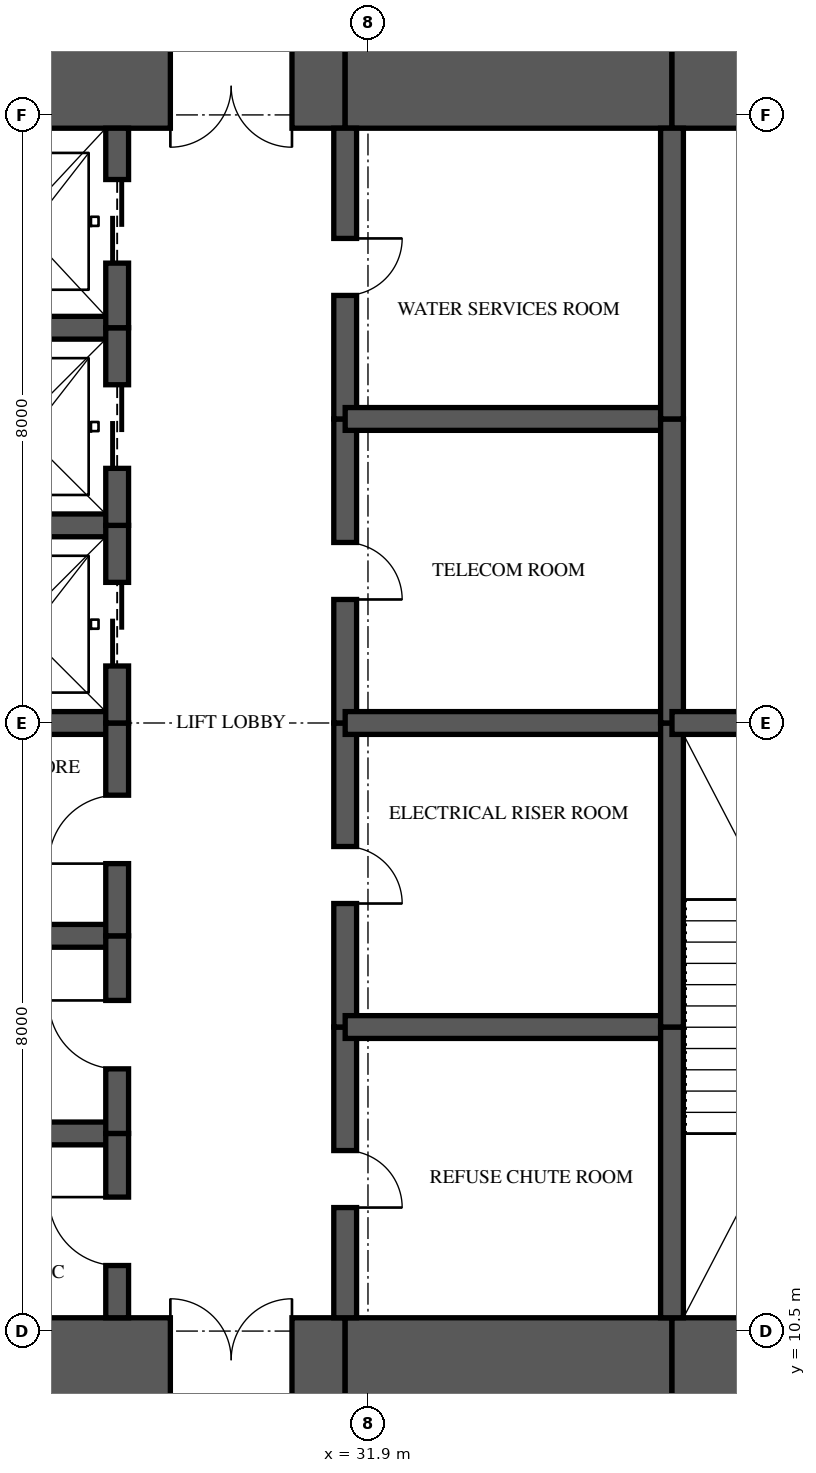
"""IFC4 building model, lengths in metres.
Left out: names, types, materials, properties, quantities, classifications, styles, units other than length and angle.
Written with IfcOpenShell. Run it as: python <this file> out.ifc"""

import sys

from ifc_helpers import new_model, si_unit, direction, frame, frame_2d, origin, place, context, subcontext, project, spatial, rectangle, extrude, element, fill, save


model = new_model("IFC4")
c1 = context("Model", 3, precision=1e-05, world=origin(), true_north=direction((0.0, 1.0)))
c2 = subcontext(c1, "Body", "Model", "MODEL_VIEW")
j1 = project(units=[si_unit("LENGTHUNIT", "METRE"), si_unit("PLANEANGLEUNIT", "RADIAN")], contexts=[c1])
p1 = place(None, origin())
s1 = spatial("IfcSite", under=j1, at=p1, CompositionType="ELEMENT")
p2 = place(p1, origin())
s2 = spatial("IfcBuilding", under=s1, at=p2, CompositionType="ELEMENT")
p3 = place(p2, frame((0.0, 0.0, 217.95)))
s3 = spatial("IfcBuildingStorey", under=s2, at=p3, CompositionType="ELEMENT", Elevation=217.95)
p4 = place(p3, frame((26.0, 10.125, 0.0), z_axis=(0.0, 0.0, 1.0), x_axis=(1.0, 0.0, 0.0)))
e1 = element("IfcWall", 1, at=p4, inside=s3, PredefinedType="SHEAR", context=c2, shape_type="SweptSolid", body=[
    extrude(rectangle(XDim=5.6, YDim=1.1, at=frame_2d((2.8, 0.0))), origin(), (0.0, 0.0, 1.0), 3.5),
])
p5 = place(p4, frame((3.3, 0.0, 0.0)))
e2 = element("IfcOpeningElement", 2, at=p5, cuts=e1, PredefinedType="OPENING", context=c2, shape_type="SweptSolid", body=[
    extrude(rectangle(XDim=1.6, YDim=2.1, at=frame_2d((0.8, 1.05))), frame((0.0, 0.56, 0.0), z_axis=(0.0, -1.0, 0.0), x_axis=(1.0, 0.0, 0.0)), (0.0, 0.0, 1.0), 1.12),
])
p6 = place(p3, frame((31.6, 10.125, 0.0), z_axis=(0.0, 0.0, 1.0), x_axis=(1.0, 0.0, 0.0)))
e3 = element("IfcWall", 3, at=p6, inside=s3, PredefinedType="SHEAR", context=c2, shape_type="SweptSolid", body=[
    extrude(rectangle(XDim=4.3, YDim=1.1, at=frame_2d((2.15, 0.0))), origin(), (0.0, 0.0, 1.0), 3.5),
])
p7 = place(p3, frame((35.9, 10.125, 0.0), z_axis=(0.0, 0.0, 1.0), x_axis=(1.0, 0.0, 0.0)))
e4 = element("IfcWall", 4, at=p7, inside=s3, PredefinedType="SHEAR", context=c2, shape_type="SweptSolid", body=[
    extrude(rectangle(XDim=8.175, YDim=1.1, at=frame_2d((4.087, 0.0))), origin(), (0.0, 0.0, 1.0), 3.5),
])
p8 = place(p7, frame((2.7, 0.0, 0.0)))
e5 = element("IfcOpeningElement", 5, at=p8, cuts=e4, PredefinedType="OPENING", context=c2, shape_type="SweptSolid", body=[
    extrude(rectangle(XDim=1.0, YDim=2.1, at=frame_2d((0.5, 1.05))), frame((0.0, 0.56, 0.0), z_axis=(0.0, -1.0, 0.0), x_axis=(1.0, 0.0, 0.0)), (0.0, 0.0, 1.0), 1.12),
])
p9 = place(p3, frame((44.075, 26.875, 0.0), z_axis=(0.0, 0.0, 1.0), x_axis=(-1.0, 0.0, 0.0)))
e6 = element("IfcWall", 6, at=p9, inside=s3, PredefinedType="SHEAR", context=c2, shape_type="SweptSolid", body=[
    extrude(rectangle(XDim=8.175, YDim=1.1, at=frame_2d((4.087, 0.0))), origin(), (0.0, 0.0, 1.0), 3.5),
])
p10 = place(p9, frame((5.575, 0.0, 0.0)))
e7 = element("IfcOpeningElement", 7, at=p10, cuts=e6, PredefinedType="OPENING", context=c2, shape_type="SweptSolid", body=[
    extrude(rectangle(XDim=0.9, YDim=2.1, at=frame_2d((0.45, 1.05))), frame((0.0, 0.56, 0.0), z_axis=(0.0, -1.0, 0.0), x_axis=(1.0, 0.0, 0.0)), (0.0, 0.0, 1.0), 1.12),
])
p11 = place(p3, frame((35.9, 26.875, 0.0), z_axis=(0.0, 0.0, 1.0), x_axis=(-1.0, 0.0, 0.0)))
e8 = element("IfcWall", 8, at=p11, inside=s3, PredefinedType="SHEAR", context=c2, shape_type="SweptSolid", body=[
    extrude(rectangle(XDim=4.3, YDim=1.1, at=frame_2d((2.15, 0.0))), origin(), (0.0, 0.0, 1.0), 3.5),
])
p12 = place(p3, frame((31.6, 26.875, 0.0), z_axis=(0.0, 0.0, 1.0), x_axis=(-1.0, 0.0, 0.0)))
e9 = element("IfcWall", 9, at=p12, inside=s3, PredefinedType="SHEAR", context=c2, shape_type="SweptSolid", body=[
    extrude(rectangle(XDim=5.6, YDim=1.1, at=frame_2d((2.8, 0.0))), origin(), (0.0, 0.0, 1.0), 3.5),
])
p13 = place(p12, frame((0.7, 0.0, 0.0)))
e10 = element("IfcOpeningElement", 10, at=p13, cuts=e9, PredefinedType="OPENING", context=c2, shape_type="SweptSolid", body=[
    extrude(rectangle(XDim=1.6, YDim=2.1, at=frame_2d((0.8, 1.05))), frame((0.0, 0.56, 0.0), z_axis=(0.0, -1.0, 0.0), x_axis=(1.0, 0.0, 0.0)), (0.0, 0.0, 1.0), 1.12),
])
p14 = place(p3, frame((28.6, 10.675, 0.0), z_axis=(0.0, 0.0, 1.0), x_axis=(0.0, 1.0, 0.0)))
e11 = element("IfcWall", 11, at=p14, inside=s3, PredefinedType="SHEAR", context=c2, shape_type="SweptSolid", body=[
    extrude(rectangle(XDim=2.425, YDim=0.3, at=frame_2d((1.212, 0.0))), origin(), (0.0, 0.0, 1.0), 3.5),
])
p15 = place(p14, frame((0.688, 0.0, 0.0)))
e12 = element("IfcOpeningElement", 12, at=p15, cuts=e11, PredefinedType="OPENING", context=c2, shape_type="SweptSolid", body=[
    extrude(rectangle(XDim=0.9, YDim=2.1, at=frame_2d((0.45, 1.05))), frame((0.0, 0.16, 0.0), z_axis=(0.0, -1.0, 0.0), x_axis=(1.0, 0.0, 0.0)), (0.0, 0.0, 1.0), 0.32),
])
p16 = place(p3, frame((28.6, 13.1, 0.0), z_axis=(0.0, 0.0, 1.0), x_axis=(0.0, 1.0, 0.0)))
e13 = element("IfcWall", 13, at=p16, inside=s3, PredefinedType="SHEAR", context=c2, shape_type="SweptSolid", body=[
    extrude(rectangle(XDim=2.6, YDim=0.3, at=frame_2d((1.3, 0.0))), origin(), (0.0, 0.0, 1.0), 3.5),
])
p17 = place(p16, frame((0.85, 0.0, 0.0)))
e14 = element("IfcOpeningElement", 14, at=p17, cuts=e13, PredefinedType="OPENING", context=c2, shape_type="SweptSolid", body=[
    extrude(rectangle(XDim=0.9, YDim=2.1, at=frame_2d((0.45, 1.05))), frame((0.0, 0.16, 0.0), z_axis=(0.0, -1.0, 0.0), x_axis=(1.0, 0.0, 0.0)), (0.0, 0.0, 1.0), 0.32),
])
p18 = place(p3, frame((28.6, 15.7, 0.0), z_axis=(0.0, 0.0, 1.0), x_axis=(0.0, 1.0, 0.0)))
e15 = element("IfcWall", 15, at=p18, inside=s3, PredefinedType="SHEAR", context=c2, shape_type="SweptSolid", body=[
    extrude(rectangle(XDim=2.8, YDim=0.3, at=frame_2d((1.4, 0.0))), origin(), (0.0, 0.0, 1.0), 3.5),
])
p19 = place(p18, frame((0.95, 0.0, 0.0)))
e16 = element("IfcOpeningElement", 16, at=p19, cuts=e15, PredefinedType="OPENING", context=c2, shape_type="SweptSolid", body=[
    extrude(rectangle(XDim=0.9, YDim=2.1, at=frame_2d((0.45, 1.05))), frame((0.0, 0.16, 0.0), z_axis=(0.0, -1.0, 0.0), x_axis=(1.0, 0.0, 0.0)), (0.0, 0.0, 1.0), 0.32),
])
p20 = place(p3, frame((28.6, 18.5, 0.0), z_axis=(0.0, 0.0, 1.0), x_axis=(0.0, 1.0, 0.0)))
e17 = element("IfcWall", 17, at=p20, inside=s3, PredefinedType="SHEAR", context=c2, shape_type="SweptSolid", body=[
    extrude(rectangle(XDim=2.6, YDim=0.3, at=frame_2d((1.3, 0.0))), origin(), (0.0, 0.0, 1.0), 3.5),
])
p21 = place(p20, frame((0.75, 0.0, 0.0)))
e18 = element("IfcOpeningElement", 18, at=p21, cuts=e17, PredefinedType="OPENING", context=c2, shape_type="SweptSolid", body=[
    extrude(rectangle(XDim=1.1, YDim=2.1, at=frame_2d((0.55, 1.05))), frame((0.0, 0.16, 0.0), z_axis=(0.0, -1.0, 0.0), x_axis=(1.0, 0.0, 0.0)), (0.0, 0.0, 1.0), 0.32),
])
p22 = place(p3, frame((28.6, 21.1, 0.0), z_axis=(0.0, 0.0, 1.0), x_axis=(0.0, 1.0, 0.0)))
e19 = element("IfcWall", 19, at=p22, inside=s3, PredefinedType="SHEAR", context=c2, shape_type="SweptSolid", body=[
    extrude(rectangle(XDim=2.6, YDim=0.3, at=frame_2d((1.3, 0.0))), origin(), (0.0, 0.0, 1.0), 3.5),
])
p23 = place(p22, frame((0.75, 0.0, 0.0)))
e20 = element("IfcOpeningElement", 20, at=p23, cuts=e19, PredefinedType="OPENING", context=c2, shape_type="SweptSolid", body=[
    extrude(rectangle(XDim=1.1, YDim=2.1, at=frame_2d((0.55, 1.05))), frame((0.0, 0.16, 0.0), z_axis=(0.0, -1.0, 0.0), x_axis=(1.0, 0.0, 0.0)), (0.0, 0.0, 1.0), 0.32),
])
p24 = place(p3, frame((28.6, 23.7, 0.0), z_axis=(0.0, 0.0, 1.0), x_axis=(0.0, 1.0, 0.0)))
e21 = element("IfcWall", 21, at=p24, inside=s3, PredefinedType="SHEAR", context=c2, shape_type="SweptSolid", body=[
    extrude(rectangle(XDim=2.625, YDim=0.3, at=frame_2d((1.312, 0.0))), origin(), (0.0, 0.0, 1.0), 3.5),
])
p25 = place(p24, frame((0.85, 0.0, 0.0)))
e22 = element("IfcOpeningElement", 22, at=p25, cuts=e21, PredefinedType="OPENING", context=c2, shape_type="SweptSolid", body=[
    extrude(rectangle(XDim=1.1, YDim=2.1, at=frame_2d((0.55, 1.05))), frame((0.0, 0.16, 0.0), z_axis=(0.0, -1.0, 0.0), x_axis=(1.0, 0.0, 0.0)), (0.0, 0.0, 1.0), 0.32),
])
p26 = place(p3, frame((31.6, 10.675, 0.0), z_axis=(0.0, 0.0, 1.0), x_axis=(0.0, 1.0, 0.0)))
e23 = element("IfcWall", 23, at=p26, inside=s3, PredefinedType="SHEAR", context=c2, shape_type="SweptSolid", body=[
    extrude(rectangle(XDim=3.825, YDim=0.3, at=frame_2d((1.913, 0.0))), origin(), (0.0, 0.0, 1.0), 3.5),
])
p27 = place(p26, frame((1.45, 0.0, 0.0)))
e24 = element("IfcOpeningElement", 24, at=p27, cuts=e23, PredefinedType="OPENING", context=c2, shape_type="SweptSolid", body=[
    extrude(rectangle(XDim=0.75, YDim=2.1, at=frame_2d((0.375, 1.05))), frame((0.0, 0.16, 0.0), z_axis=(0.0, -1.0, 0.0), x_axis=(1.0, 0.0, 0.0)), (0.0, 0.0, 1.0), 0.32),
])
p28 = place(p3, frame((31.6, 14.5, 0.0), z_axis=(0.0, 0.0, 1.0), x_axis=(0.0, 1.0, 0.0)))
e25 = element("IfcWall", 25, at=p28, inside=s3, PredefinedType="SHEAR", context=c2, shape_type="SweptSolid", body=[
    extrude(rectangle(XDim=4.0, YDim=0.3, at=frame_2d((2.0, 0.0))), origin(), (0.0, 0.0, 1.0), 3.5),
])
p29 = place(p28, frame((1.625, 0.0, 0.0)))
e26 = element("IfcOpeningElement", 26, at=p29, cuts=e25, PredefinedType="OPENING", context=c2, shape_type="SweptSolid", body=[
    extrude(rectangle(XDim=0.75, YDim=2.1, at=frame_2d((0.375, 1.05))), frame((0.0, 0.16, 0.0), z_axis=(0.0, -1.0, 0.0), x_axis=(1.0, 0.0, 0.0)), (0.0, 0.0, 1.0), 0.32),
])
p30 = place(p3, frame((31.6, 18.5, 0.0), z_axis=(0.0, 0.0, 1.0), x_axis=(0.0, 1.0, 0.0)))
e27 = element("IfcWall", 27, at=p30, inside=s3, PredefinedType="SHEAR", context=c2, shape_type="SweptSolid", body=[
    extrude(rectangle(XDim=4.0, YDim=0.3, at=frame_2d((2.0, 0.0))), origin(), (0.0, 0.0, 1.0), 3.5),
])
p31 = place(p30, frame((1.625, 0.0, 0.0)))
e28 = element("IfcOpeningElement", 28, at=p31, cuts=e27, PredefinedType="OPENING", context=c2, shape_type="SweptSolid", body=[
    extrude(rectangle(XDim=0.75, YDim=2.1, at=frame_2d((0.375, 1.05))), frame((0.0, 0.16, 0.0), z_axis=(0.0, -1.0, 0.0), x_axis=(1.0, 0.0, 0.0)), (0.0, 0.0, 1.0), 0.32),
])
p32 = place(p3, frame((31.6, 22.5, 0.0), z_axis=(0.0, 0.0, 1.0), x_axis=(0.0, 1.0, 0.0)))
e29 = element("IfcWall", 29, at=p32, inside=s3, PredefinedType="SHEAR", context=c2, shape_type="SweptSolid", body=[
    extrude(rectangle(XDim=3.825, YDim=0.3, at=frame_2d((1.913, 0.0))), origin(), (0.0, 0.0, 1.0), 3.5),
])
p33 = place(p32, frame((1.625, 0.0, 0.0)))
e30 = element("IfcOpeningElement", 30, at=p33, cuts=e29, PredefinedType="OPENING", context=c2, shape_type="SweptSolid", body=[
    extrude(rectangle(XDim=0.75, YDim=2.1, at=frame_2d((0.375, 1.05))), frame((0.0, 0.16, 0.0), z_axis=(0.0, -1.0, 0.0), x_axis=(1.0, 0.0, 0.0)), (0.0, 0.0, 1.0), 0.32),
])
p34 = place(p3, frame((35.9, 10.675, 0.0), z_axis=(0.0, 0.0, 1.0), x_axis=(0.0, 1.0, 0.0)))
e31 = element("IfcWall", 31, at=p34, inside=s3, PredefinedType="SHEAR", context=c2, shape_type="SweptSolid", body=[
    extrude(rectangle(XDim=3.825, YDim=0.3, at=frame_2d((1.913, 0.0))), origin(), (0.0, 0.0, 1.0), 3.5),
])
for number, where, z_axis, x_axis in (
    (32, (35.9, 14.5, 0.0), (0.0, 0.0, 1.0), (0.0, 1.0, 0.0)),
    (33, (35.9, 18.5, 0.0), (0.0, 0.0, 1.0), (0.0, 1.0, 0.0)),
):
    element("IfcWall", number, at=place(p3, frame(where, z_axis=z_axis, x_axis=x_axis)), inside=s3, PredefinedType="SHEAR", context=c2, shape_type="SweptSolid", body=[
        extrude(rectangle(XDim=4.0, YDim=0.3, at=frame_2d((2.0, 0.0))), origin(), (0.0, 0.0, 1.0), 3.5),
    ])
p35 = place(p3, frame((35.9, 22.5, 0.0), z_axis=(0.0, 0.0, 1.0), x_axis=(0.0, 1.0, 0.0)))
e34 = element("IfcWall", 34, at=p35, inside=s3, PredefinedType="SHEAR", context=c2, shape_type="SweptSolid", body=[
    extrude(rectangle(XDim=3.825, YDim=0.3, at=frame_2d((1.913, 0.0))), origin(), (0.0, 0.0, 1.0), 3.5),
])
for number, where, z_axis, x_axis in (
    (35, (26.0, 13.1, 0.0), (0.0, 0.0, 1.0), (1.0, 0.0, 0.0)),
    (36, (26.0, 15.7, 0.0), (0.0, 0.0, 1.0), (1.0, 0.0, 0.0)),
    (37, (26.0, 18.5, 0.0), (0.0, 0.0, 1.0), (1.0, 0.0, 0.0)),
    (38, (26.0, 21.1, 0.0), (0.0, 0.0, 1.0), (1.0, 0.0, 0.0)),
    (39, (26.0, 23.7, 0.0), (0.0, 0.0, 1.0), (1.0, 0.0, 0.0)),
):
    element("IfcWall", number, at=place(p3, frame(where, z_axis=z_axis, x_axis=x_axis)), inside=s3, PredefinedType="SHEAR", context=c2, shape_type="SweptSolid", body=[
        extrude(rectangle(XDim=2.6, YDim=0.3, at=frame_2d((1.3, 0.0))), origin(), (0.0, 0.0, 1.0), 3.5),
    ])
for number, where, z_axis, x_axis in (
    (40, (31.6, 14.5, 0.0), (0.0, 0.0, 1.0), (1.0, 0.0, 0.0)),
    (41, (31.6, 18.5, 0.0), (0.0, 0.0, 1.0), (1.0, 0.0, 0.0)),
    (42, (31.6, 22.5, 0.0), (0.0, 0.0, 1.0), (1.0, 0.0, 0.0)),
):
    element("IfcWall", number, at=place(p3, frame(where, z_axis=z_axis, x_axis=x_axis)), inside=s3, PredefinedType="SHEAR", context=c2, shape_type="SweptSolid", body=[
        extrude(rectangle(XDim=4.3, YDim=0.3, at=frame_2d((2.15, 0.0))), origin(), (0.0, 0.0, 1.0), 3.5),
    ])
p36 = place(p3, frame((35.9, 18.5, 0.0), z_axis=(0.0, 0.0, 1.0), x_axis=(1.0, 0.0, 0.0)))
e43 = element("IfcWall", 43, at=p36, inside=s3, PredefinedType="SHEAR", context=c2, shape_type="SweptSolid", body=[
    extrude(rectangle(XDim=4.3, YDim=0.3, at=frame_2d((2.15, 0.0))), origin(), (0.0, 0.0, 1.0), 3.5),
])
p37 = place(p21, origin())
e44 = element("IfcDoor", 44, at=p37, inside=s3, OperationType="SLIDING_TO_LEFT", PredefinedType="DOOR", context=c2, shape_type="SweptSolid", body=[
    extrude(rectangle(XDim=1.1, YDim=2.1, at=frame_2d((0.55, 1.05))), frame((0.0, 0.025, 0.0), z_axis=(0.0, -1.0, 0.0), x_axis=(1.0, 0.0, 0.0)), (0.0, 0.0, 1.0), 0.05),
])
fill(e18, e44)
p38 = place(p23, origin())
e45 = element("IfcDoor", 45, at=p38, inside=s3, OperationType="SLIDING_TO_LEFT", PredefinedType="DOOR", context=c2, shape_type="SweptSolid", body=[
    extrude(rectangle(XDim=1.1, YDim=2.1, at=frame_2d((0.55, 1.05))), frame((0.0, 0.025, 0.0), z_axis=(0.0, -1.0, 0.0), x_axis=(1.0, 0.0, 0.0)), (0.0, 0.0, 1.0), 0.05),
])
fill(e20, e45)
p39 = place(p25, origin())
e46 = element("IfcDoor", 46, at=p39, inside=s3, OperationType="SLIDING_TO_LEFT", PredefinedType="DOOR", context=c2, shape_type="SweptSolid", body=[
    extrude(rectangle(XDim=1.1, YDim=2.1, at=frame_2d((0.55, 1.05))), frame((0.0, 0.025, 0.0), z_axis=(0.0, -1.0, 0.0), x_axis=(1.0, 0.0, 0.0)), (0.0, 0.0, 1.0), 0.05),
])
fill(e22, e46)
p40 = place(p15, origin())
e47 = element("IfcDoor", 47, at=p40, inside=s3, OperationType="SINGLE_SWING_RIGHT", PredefinedType="DOOR", context=c2, shape_type="SweptSolid", body=[
    extrude(rectangle(XDim=0.9, YDim=2.1, at=frame_2d((0.45, 1.05))), frame((0.0, 0.025, 0.0), z_axis=(0.0, -1.0, 0.0), x_axis=(1.0, 0.0, 0.0)), (0.0, 0.0, 1.0), 0.05),
])
fill(e12, e47)
p41 = place(p17, origin())
e48 = element("IfcDoor", 48, at=p41, inside=s3, OperationType="SINGLE_SWING_RIGHT", PredefinedType="DOOR", context=c2, shape_type="SweptSolid", body=[
    extrude(rectangle(XDim=0.9, YDim=2.1, at=frame_2d((0.45, 1.05))), frame((0.0, 0.025, 0.0), z_axis=(0.0, -1.0, 0.0), x_axis=(1.0, 0.0, 0.0)), (0.0, 0.0, 1.0), 0.05),
])
fill(e14, e48)
p42 = place(p19, origin())
e49 = element("IfcDoor", 49, at=p42, inside=s3, OperationType="SINGLE_SWING_LEFT", PredefinedType="DOOR", context=c2, shape_type="SweptSolid", body=[
    extrude(rectangle(XDim=0.9, YDim=2.1, at=frame_2d((0.45, 1.05))), frame((0.0, 0.025, 0.0), z_axis=(0.0, -1.0, 0.0), x_axis=(1.0, 0.0, 0.0)), (0.0, 0.0, 1.0), 0.05),
])
fill(e16, e49)
p43 = place(p5, origin())
e50 = element("IfcDoor", 50, at=p43, inside=s3, OperationType="DOUBLE_DOOR_SINGLE_SWING", PredefinedType="DOOR", context=c2, shape_type="SweptSolid", body=[
    extrude(rectangle(XDim=1.6, YDim=2.1, at=frame_2d((0.8, 1.05))), frame((0.0, 0.025, 0.0), z_axis=(0.0, -1.0, 0.0), x_axis=(1.0, 0.0, 0.0)), (0.0, 0.0, 1.0), 0.05),
])
fill(e2, e50)
p44 = place(p13, origin())
e51 = element("IfcDoor", 51, at=p44, inside=s3, OperationType="DOUBLE_DOOR_SINGLE_SWING", PredefinedType="DOOR", context=c2, shape_type="SweptSolid", body=[
    extrude(rectangle(XDim=1.6, YDim=2.1, at=frame_2d((0.8, 1.05))), frame((0.0, 0.025, 0.0), z_axis=(0.0, -1.0, 0.0), x_axis=(1.0, 0.0, 0.0)), (0.0, 0.0, 1.0), 0.05),
])
fill(e10, e51)
p45 = place(p27, frame((0.75, 0.0, 0.0), z_axis=(0.0, 0.0, 1.0), x_axis=(-1.0, 0.0, 0.0)))
e52 = element("IfcDoor", 52, at=p45, inside=s3, OperationType="SINGLE_SWING_RIGHT", PredefinedType="DOOR", context=c2, shape_type="SweptSolid", body=[
    extrude(rectangle(XDim=0.75, YDim=2.1, at=frame_2d((0.375, 1.05))), frame((0.0, 0.025, 0.0), z_axis=(0.0, -1.0, 0.0), x_axis=(1.0, 0.0, 0.0)), (0.0, 0.0, 1.0), 0.05),
])
fill(e24, e52)
p46 = place(p29, frame((0.75, 0.0, 0.0), z_axis=(0.0, 0.0, 1.0), x_axis=(-1.0, 0.0, 0.0)))
e53 = element("IfcDoor", 53, at=p46, inside=s3, OperationType="SINGLE_SWING_RIGHT", PredefinedType="DOOR", context=c2, shape_type="SweptSolid", body=[
    extrude(rectangle(XDim=0.75, YDim=2.1, at=frame_2d((0.375, 1.05))), frame((0.0, 0.025, 0.0), z_axis=(0.0, -1.0, 0.0), x_axis=(1.0, 0.0, 0.0)), (0.0, 0.0, 1.0), 0.05),
])
fill(e26, e53)
p47 = place(p31, frame((0.75, 0.0, 0.0), z_axis=(0.0, 0.0, 1.0), x_axis=(-1.0, 0.0, 0.0)))
e54 = element("IfcDoor", 54, at=p47, inside=s3, OperationType="SINGLE_SWING_RIGHT", PredefinedType="DOOR", context=c2, shape_type="SweptSolid", body=[
    extrude(rectangle(XDim=0.75, YDim=2.1, at=frame_2d((0.375, 1.05))), frame((0.0, 0.025, 0.0), z_axis=(0.0, -1.0, 0.0), x_axis=(1.0, 0.0, 0.0)), (0.0, 0.0, 1.0), 0.05),
])
fill(e28, e54)
p48 = place(p33, frame((0.75, 0.0, 0.0), z_axis=(0.0, 0.0, 1.0), x_axis=(-1.0, 0.0, 0.0)))
e55 = element("IfcDoor", 55, at=p48, inside=s3, OperationType="SINGLE_SWING_LEFT", PredefinedType="DOOR", context=c2, shape_type="SweptSolid", body=[
    extrude(rectangle(XDim=0.75, YDim=2.1, at=frame_2d((0.375, 1.05))), frame((0.0, 0.025, 0.0), z_axis=(0.0, -1.0, 0.0), x_axis=(1.0, 0.0, 0.0)), (0.0, 0.0, 1.0), 0.05),
])
fill(e30, e55)
save(model, sys.argv[1])
